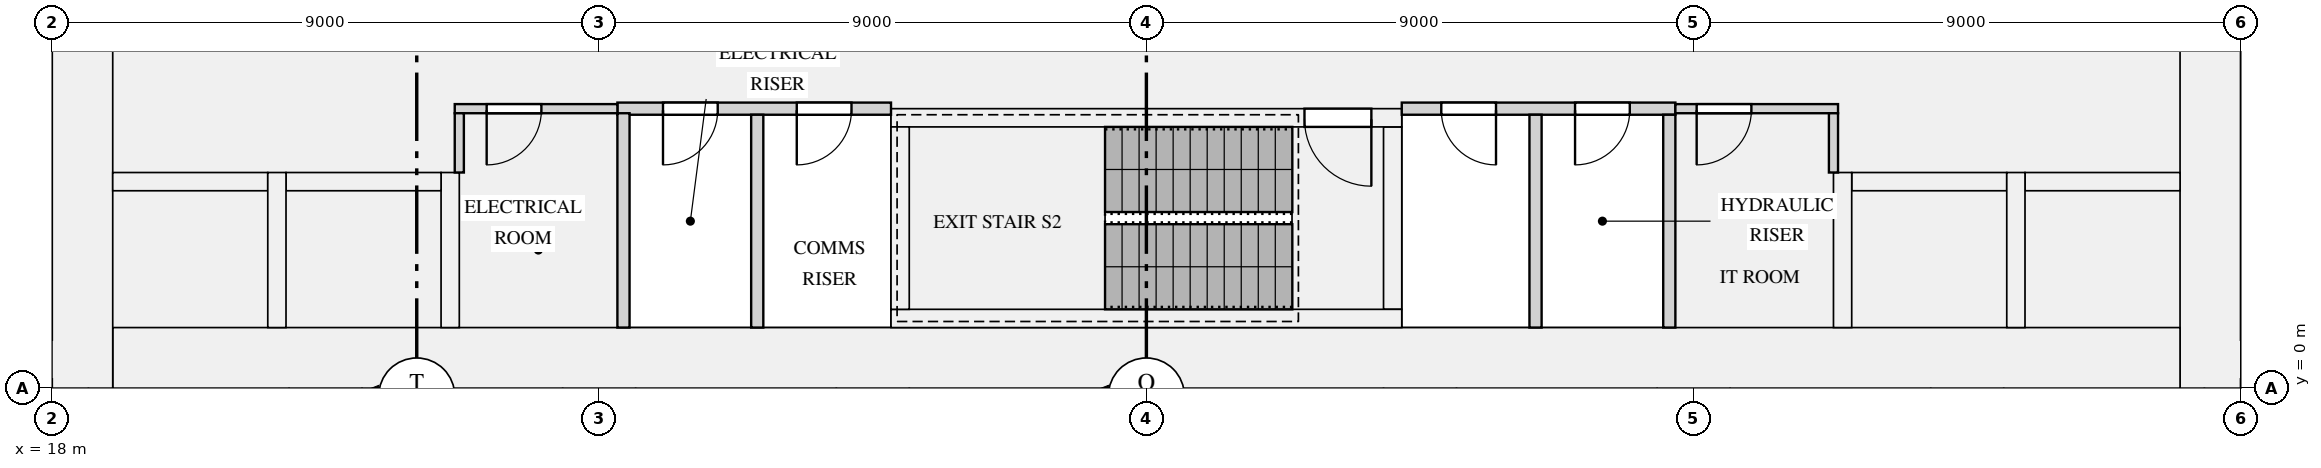
"""IFC4 building model, lengths in metres.
Left out: names, types, materials, properties, quantities, classifications, styles, units other than length and angle.
Written with IfcOpenShell. Run it as: python <this file> out.ifc"""

import sys

from ifc_helpers import new_model, si_unit, direction, frame, frame_2d, origin, place, context, subcontext, project, spatial, rectangle, extrude, element, fill, save


model = new_model("IFC4")
c1 = context("Model", 3, precision=1e-05, world=origin(), true_north=direction((0.0, 1.0)))
c2 = subcontext(c1, "Body", "Model", "MODEL_VIEW")
j1 = project(units=[si_unit("LENGTHUNIT", "METRE"), si_unit("PLANEANGLEUNIT", "RADIAN")], contexts=[c1])
p1 = place(None, origin())
s1 = spatial("IfcSite", under=j1, at=p1, CompositionType="ELEMENT")
p2 = place(p1, origin())
s2 = spatial("IfcBuilding", under=s1, at=p2, CompositionType="ELEMENT")
p3 = place(p2, frame((0.0, 0.0, 73.05)))
s3 = spatial("IfcBuildingStorey", under=s2, at=p3, CompositionType="ELEMENT", Elevation=73.05)
for number, where, z_axis, x_axis in (
    (1, (18.5, 0.0, 0.0), (0.0, 0.0, 1.0), (0.0, 1.0, 0.0)),
    (2, (53.5, 0.0, 0.0), (0.0, 0.0, 1.0), (0.0, 1.0, 0.0)),
):
    element("IfcWall", number, at=place(p3, frame(where, z_axis=z_axis, x_axis=x_axis)), inside=s3, PredefinedType="SHEAR", context=c2, shape_type="SweptSolid", body=[
        extrude(rectangle(XDim=12.5, YDim=1.0, at=frame_2d((6.25, 0.0))), origin(), (0.0, 0.0, 1.0), 4.2),
    ])
p4 = place(p3, frame((19.0, 0.5, 0.0), z_axis=(0.0, 0.0, 1.0), x_axis=(1.0, 0.0, 0.0)))
e3 = element("IfcWall", 3, at=p4, inside=s3, PredefinedType="SHEAR", context=c2, shape_type="SweptSolid", body=[
    extrude(rectangle(XDim=34.0, YDim=1.0, at=frame_2d((17.0, 0.0))), origin(), (0.0, 0.0, 1.0), 4.2),
])
p5 = place(p3, frame((19.0, 3.4, 0.0), z_axis=(0.0, 0.0, 1.0), x_axis=(1.0, 0.0, 0.0)))
e4 = element("IfcWall", 4, at=p5, inside=s3, PredefinedType="SHEAR", context=c2, shape_type="SweptSolid", body=[
    extrude(rectangle(XDim=2.55, YDim=0.3, at=frame_2d((1.275, 0.0))), origin(), (0.0, 0.0, 1.0), 4.2),
])
p6 = place(p3, frame((21.85, 3.4, 0.0), z_axis=(0.0, 0.0, 1.0), x_axis=(1.0, 0.0, 0.0)))
e5 = element("IfcWall", 5, at=p6, inside=s3, PredefinedType="SHEAR", context=c2, shape_type="SweptSolid", body=[
    extrude(rectangle(XDim=2.55, YDim=0.3, at=frame_2d((1.275, 0.0))), origin(), (0.0, 0.0, 1.0), 4.2),
])
for number, where, z_axis, x_axis in (
    (6, (21.7, 1.0, 0.0), (0.0, 0.0, 1.0), (0.0, 1.0, 0.0)),
    (7, (24.55, 1.0, 0.0), (0.0, 0.0, 1.0), (0.0, 1.0, 0.0)),
):
    element("IfcWall", number, at=place(p3, frame(where, z_axis=z_axis, x_axis=x_axis)), inside=s3, PredefinedType="SHEAR", context=c2, shape_type="SweptSolid", body=[
        extrude(rectangle(XDim=2.55, YDim=0.3, at=frame_2d((1.275, 0.0))), origin(), (0.0, 0.0, 1.0), 4.2),
    ])
p7 = place(p3, frame((47.6, 3.4, 0.0), z_axis=(0.0, 0.0, 1.0), x_axis=(1.0, 0.0, 0.0)))
e8 = element("IfcWall", 8, at=p7, inside=s3, PredefinedType="SHEAR", context=c2, shape_type="SweptSolid", body=[
    extrude(rectangle(XDim=2.55, YDim=0.3, at=frame_2d((1.275, 0.0))), origin(), (0.0, 0.0, 1.0), 4.2),
])
for number, where, z_axis, x_axis in (
    (9, (47.45, 1.0, 0.0), (0.0, 0.0, 1.0), (0.0, 1.0, 0.0)),
    (10, (50.45, 3.4, 0.0), (0.0, 0.0, 1.0), (1.0, 0.0, 0.0)),
    (11, (50.3, 1.0, 0.0), (0.0, 0.0, 1.0), (0.0, 1.0, 0.0)),
):
    element("IfcWall", number, at=place(p3, frame(where, z_axis=z_axis, x_axis=x_axis)), inside=s3, PredefinedType="SHEAR", context=c2, shape_type="SweptSolid", body=[
        extrude(rectangle(XDim=2.55, YDim=0.3, at=frame_2d((1.275, 0.0))), origin(), (0.0, 0.0, 1.0), 4.2),
    ])
p8 = place(p3, frame((31.8, 1.15, 0.0), z_axis=(0.0, 0.0, 1.0), x_axis=(1.0, 0.0, 0.0)))
e12 = element("IfcWall", 12, at=p8, inside=s3, PredefinedType="SHEAR", context=c2, shape_type="SweptSolid", body=[
    extrude(rectangle(XDim=8.4, YDim=0.3, at=frame_2d((4.2, 0.0))), origin(), (0.0, 0.0, 1.0), 4.2),
])
p9 = place(p3, frame((31.8, 4.45, 0.0), z_axis=(0.0, 0.0, 1.0), x_axis=(1.0, 0.0, 0.0)))
e13 = element("IfcWall", 13, at=p9, inside=s3, PredefinedType="SHEAR", context=c2, shape_type="SweptSolid", body=[
    extrude(rectangle(XDim=8.4, YDim=0.3, at=frame_2d((4.2, 0.0))), origin(), (0.0, 0.0, 1.0), 4.2),
])
p10 = place(p9, frame((6.8, 0.0, 0.0)))
e14 = element("IfcOpeningElement", 14, at=p10, cuts=e13, PredefinedType="OPENING", context=c2, shape_type="SweptSolid", body=[
    extrude(rectangle(XDim=1.1, YDim=2.1, at=frame_2d((0.55, 1.05))), frame((0.0, 0.16, 0.0), z_axis=(0.0, -1.0, 0.0), x_axis=(1.0, 0.0, 0.0)), (0.0, 0.0, 1.0), 0.32),
])
for number, where, z_axis, x_axis in (
    (15, (31.95, 1.3, 0.0), (0.0, 0.0, 1.0), (0.0, 1.0, 0.0)),
    (16, (40.05, 1.3, 0.0), (0.0, 0.0, 1.0), (0.0, 1.0, 0.0)),
):
    element("IfcWall", number, at=place(p3, frame(where, z_axis=z_axis, x_axis=x_axis)), inside=s3, PredefinedType="SHEAR", context=c2, shape_type="SweptSolid", body=[
        extrude(rectangle(XDim=3.0, YDim=0.3, at=frame_2d((1.5, 0.0))), origin(), (0.0, 0.0, 1.0), 4.2),
    ])
p11 = place(p3, frame((27.3, 4.6, 0.0), z_axis=(0.0, 0.0, 1.0), x_axis=(1.0, 0.0, 0.0)))
e17 = element("IfcWall", 17, at=p11, inside=s3, PredefinedType="PARTITIONING", context=c2, shape_type="SweptSolid", body=[
    extrude(rectangle(XDim=4.5, YDim=0.2, at=frame_2d((2.25, 0.0))), origin(), (0.0, 0.0, 1.0), 3.7),
])
p12 = place(p11, frame((0.75, 0.0, 0.0)))
e18 = element("IfcOpeningElement", 18, at=p12, cuts=e17, PredefinedType="OPENING", context=c2, shape_type="SweptSolid", body=[
    extrude(rectangle(XDim=0.9, YDim=2.1, at=frame_2d((0.45, 1.05))), frame((0.0, 0.11, 0.0), z_axis=(0.0, -1.0, 0.0), x_axis=(1.0, 0.0, 0.0)), (0.0, 0.0, 1.0), 0.22),
])
p13 = place(p11, frame((2.95, 0.0, 0.0)))
e19 = element("IfcOpeningElement", 19, at=p13, cuts=e17, PredefinedType="OPENING", context=c2, shape_type="SweptSolid", body=[
    extrude(rectangle(XDim=0.9, YDim=2.1, at=frame_2d((0.45, 1.05))), frame((0.0, 0.11, 0.0), z_axis=(0.0, -1.0, 0.0), x_axis=(1.0, 0.0, 0.0)), (0.0, 0.0, 1.0), 0.22),
])
p14 = place(p3, frame((40.2, 4.6, 0.0), z_axis=(0.0, 0.0, 1.0), x_axis=(1.0, 0.0, 0.0)))
e20 = element("IfcWall", 20, at=p14, inside=s3, PredefinedType="PARTITIONING", context=c2, shape_type="SweptSolid", body=[
    extrude(rectangle(XDim=4.5, YDim=0.2, at=frame_2d((2.25, 0.0))), origin(), (0.0, 0.0, 1.0), 3.7),
])
p15 = place(p14, frame((0.65, 0.0, 0.0)))
e21 = element("IfcOpeningElement", 21, at=p15, cuts=e20, PredefinedType="OPENING", context=c2, shape_type="SweptSolid", body=[
    extrude(rectangle(XDim=0.9, YDim=2.1, at=frame_2d((0.45, 1.05))), frame((0.0, 0.11, 0.0), z_axis=(0.0, -1.0, 0.0), x_axis=(1.0, 0.0, 0.0)), (0.0, 0.0, 1.0), 0.22),
])
p16 = place(p14, frame((2.85, 0.0, 0.0)))
e22 = element("IfcOpeningElement", 22, at=p16, cuts=e20, PredefinedType="OPENING", context=c2, shape_type="SweptSolid", body=[
    extrude(rectangle(XDim=0.9, YDim=2.1, at=frame_2d((0.45, 1.05))), frame((0.0, 0.11, 0.0), z_axis=(0.0, -1.0, 0.0), x_axis=(1.0, 0.0, 0.0)), (0.0, 0.0, 1.0), 0.22),
])
p17 = place(p3, frame((24.625, 4.6, 0.0), z_axis=(0.0, 0.0, 1.0), x_axis=(1.0, 0.0, 0.0)))
e23 = element("IfcWall", 23, at=p17, inside=s3, PredefinedType="PARTITIONING", context=c2, shape_type="SweptSolid", body=[
    extrude(rectangle(XDim=2.675, YDim=0.15, at=frame_2d((1.337, 0.0))), origin(), (0.0, 0.0, 1.0), 3.7),
])
p18 = place(p17, frame((0.525, 0.0, 0.0)))
e24 = element("IfcOpeningElement", 24, at=p18, cuts=e23, PredefinedType="OPENING", context=c2, shape_type="SweptSolid", body=[
    extrude(rectangle(XDim=0.9, YDim=2.1, at=frame_2d((0.45, 1.05))), frame((0.0, 0.085, 0.0), z_axis=(0.0, -1.0, 0.0), x_axis=(1.0, 0.0, 0.0)), (0.0, 0.0, 1.0), 0.17),
])
p19 = place(p3, frame((44.7, 4.6, 0.0), z_axis=(0.0, 0.0, 1.0), x_axis=(1.0, 0.0, 0.0)))
e25 = element("IfcWall", 25, at=p19, inside=s3, PredefinedType="PARTITIONING", context=c2, shape_type="SweptSolid", body=[
    extrude(rectangle(XDim=2.675, YDim=0.15, at=frame_2d((1.337, 0.0))), origin(), (0.0, 0.0, 1.0), 3.7),
])
p20 = place(p19, frame((0.35, 0.0, 0.0)))
e26 = element("IfcOpeningElement", 26, at=p20, cuts=e25, PredefinedType="OPENING", context=c2, shape_type="SweptSolid", body=[
    extrude(rectangle(XDim=0.9, YDim=2.1, at=frame_2d((0.45, 1.05))), frame((0.0, 0.085, 0.0), z_axis=(0.0, -1.0, 0.0), x_axis=(1.0, 0.0, 0.0)), (0.0, 0.0, 1.0), 0.17),
])
p21 = place(p3, frame((27.4, 1.0, 0.0), z_axis=(0.0, 0.0, 1.0), x_axis=(0.0, 1.0, 0.0)))
e27 = element("IfcWall", 27, at=p21, inside=s3, PredefinedType="PARTITIONING", context=c2, shape_type="SweptSolid", body=[
    extrude(rectangle(XDim=3.525, YDim=0.2, at=frame_2d((1.762, 0.0))), origin(), (0.0, 0.0, 1.0), 3.7),
])
for number, where, z_axis, x_axis in (
    (28, (29.6, 1.0, 0.0), (0.0, 0.0, 1.0), (0.0, 1.0, 0.0)),
    (29, (42.4, 1.0, 0.0), (0.0, 0.0, 1.0), (0.0, 1.0, 0.0)),
    (30, (44.6, 1.0, 0.0), (0.0, 0.0, 1.0), (0.0, 1.0, 0.0)),
):
    element("IfcWall", number, at=place(p3, frame(where, z_axis=z_axis, x_axis=x_axis)), inside=s3, PredefinedType="PARTITIONING", context=c2, shape_type="SweptSolid", body=[
        extrude(rectangle(XDim=3.5, YDim=0.2, at=frame_2d((1.75, 0.0))), origin(), (0.0, 0.0, 1.0), 3.7),
    ])
for number, where, z_axis, x_axis in (
    (31, (24.7, 3.55, 0.0), (0.0, 0.0, 1.0), (0.0, 1.0, 0.0)),
    (32, (47.3, 3.55, 0.0), (0.0, 0.0, 1.0), (0.0, 1.0, 0.0)),
):
    element("IfcWall", number, at=place(p3, frame(where, z_axis=z_axis, x_axis=x_axis)), inside=s3, PredefinedType="PARTITIONING", context=c2, shape_type="SweptSolid", body=[
        extrude(rectangle(XDim=0.975, YDim=0.15, at=frame_2d((0.487, 0.0))), origin(), (0.0, 0.0, 1.0), 3.7),
    ])
p22 = place(p10, frame((1.1, 0.0, 0.0), z_axis=(0.0, 0.0, 1.0), x_axis=(-1.0, 0.0, 0.0)))
e33 = element("IfcDoor", 33, at=p22, inside=s3, OperationType="SINGLE_SWING_LEFT", PredefinedType="DOOR", context=c2, shape_type="SweptSolid", body=[
    extrude(rectangle(XDim=1.1, YDim=2.1, at=frame_2d((0.55, 1.05))), frame((0.0, 0.025, 0.0), z_axis=(0.0, -1.0, 0.0), x_axis=(1.0, 0.0, 0.0)), (0.0, 0.0, 1.0), 0.05),
])
fill(e14, e33)
p23 = place(p18, frame((0.9, 0.0, 0.0), z_axis=(0.0, 0.0, 1.0), x_axis=(-1.0, 0.0, 0.0)))
e34 = element("IfcDoor", 34, at=p23, inside=s3, OperationType="SINGLE_SWING_RIGHT", PredefinedType="DOOR", context=c2, shape_type="SweptSolid", body=[
    extrude(rectangle(XDim=0.9, YDim=2.1, at=frame_2d((0.45, 1.05))), frame((0.0, 0.025, 0.0), z_axis=(0.0, -1.0, 0.0), x_axis=(1.0, 0.0, 0.0)), (0.0, 0.0, 1.0), 0.05),
])
fill(e24, e34)
p24 = place(p20, frame((0.9, 0.0, 0.0), z_axis=(0.0, 0.0, 1.0), x_axis=(-1.0, 0.0, 0.0)))
e35 = element("IfcDoor", 35, at=p24, inside=s3, OperationType="SINGLE_SWING_RIGHT", PredefinedType="DOOR", context=c2, shape_type="SweptSolid", body=[
    extrude(rectangle(XDim=0.9, YDim=2.1, at=frame_2d((0.45, 1.05))), frame((0.0, 0.025, 0.0), z_axis=(0.0, -1.0, 0.0), x_axis=(1.0, 0.0, 0.0)), (0.0, 0.0, 1.0), 0.05),
])
fill(e26, e35)
p25 = place(p12, frame((0.9, 0.0, 0.0), z_axis=(0.0, 0.0, 1.0), x_axis=(-1.0, 0.0, 0.0)))
e36 = element("IfcDoor", 36, at=p25, inside=s3, OperationType="SINGLE_SWING_RIGHT", PredefinedType="DOOR", context=c2, shape_type="SweptSolid", body=[
    extrude(rectangle(XDim=0.9, YDim=2.1, at=frame_2d((0.45, 1.05))), frame((0.0, 0.025, 0.0), z_axis=(0.0, -1.0, 0.0), x_axis=(1.0, 0.0, 0.0)), (0.0, 0.0, 1.0), 0.05),
])
fill(e18, e36)
p26 = place(p13, frame((0.9, 0.0, 0.0), z_axis=(0.0, 0.0, 1.0), x_axis=(-1.0, 0.0, 0.0)))
e37 = element("IfcDoor", 37, at=p26, inside=s3, OperationType="SINGLE_SWING_RIGHT", PredefinedType="DOOR", context=c2, shape_type="SweptSolid", body=[
    extrude(rectangle(XDim=0.9, YDim=2.1, at=frame_2d((0.45, 1.05))), frame((0.0, 0.025, 0.0), z_axis=(0.0, -1.0, 0.0), x_axis=(1.0, 0.0, 0.0)), (0.0, 0.0, 1.0), 0.05),
])
fill(e19, e37)
p27 = place(p15, frame((0.9, 0.0, 0.0), z_axis=(0.0, 0.0, 1.0), x_axis=(-1.0, 0.0, 0.0)))
e38 = element("IfcDoor", 38, at=p27, inside=s3, OperationType="SINGLE_SWING_LEFT", PredefinedType="DOOR", context=c2, shape_type="SweptSolid", body=[
    extrude(rectangle(XDim=0.9, YDim=2.1, at=frame_2d((0.45, 1.05))), frame((0.0, 0.025, 0.0), z_axis=(0.0, -1.0, 0.0), x_axis=(1.0, 0.0, 0.0)), (0.0, 0.0, 1.0), 0.05),
])
fill(e21, e38)
p28 = place(p16, frame((0.9, 0.0, 0.0), z_axis=(0.0, 0.0, 1.0), x_axis=(-1.0, 0.0, 0.0)))
e39 = element("IfcDoor", 39, at=p28, inside=s3, OperationType="SINGLE_SWING_RIGHT", PredefinedType="DOOR", context=c2, shape_type="SweptSolid", body=[
    extrude(rectangle(XDim=0.9, YDim=2.1, at=frame_2d((0.45, 1.05))), frame((0.0, 0.025, 0.0), z_axis=(0.0, -1.0, 0.0), x_axis=(1.0, 0.0, 0.0)), (0.0, 0.0, 1.0), 0.05),
])
fill(e22, e39)
save(model, sys.argv[1])
